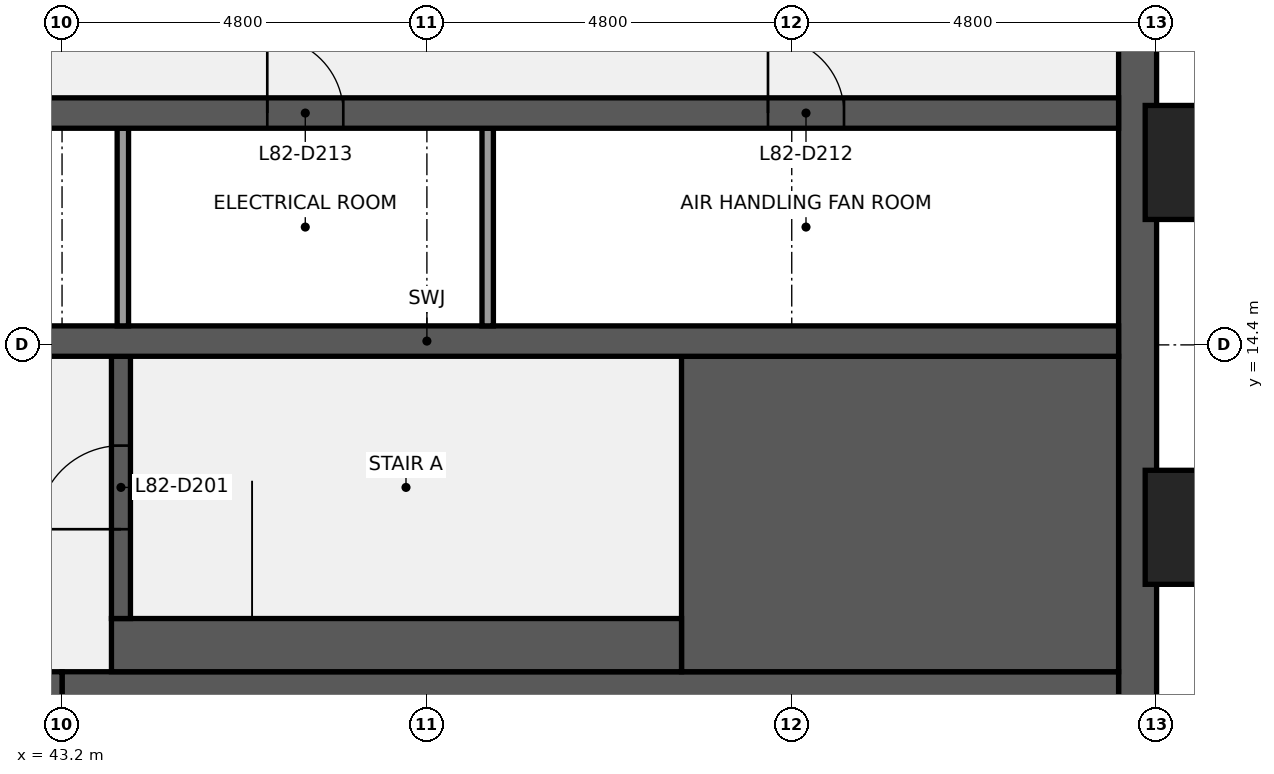
"""IFC4 building model, lengths in metres.
Left out: names, types, materials, properties, quantities, classifications, styles, units other than length and angle.
Written with IfcOpenShell. Run it as: python <this file> out.ifc"""

import sys

from ifc_helpers import new_model, si_unit, direction, frame, frame_2d, origin, origin_2d, place, context, subcontext, project, spatial, rectangle, extrude, element, fill, save


model = new_model("IFC4")
c1 = context("Model", 3, precision=1e-05, world=origin(), true_north=direction((0.0, 1.0)))
c2 = subcontext(c1, "Body", "Model", "MODEL_VIEW")
j1 = project(units=[si_unit("LENGTHUNIT", "METRE"), si_unit("PLANEANGLEUNIT", "RADIAN")], contexts=[c1])
p1 = place(None, origin())
s1 = spatial("IfcSite", under=j1, at=p1, CompositionType="ELEMENT")
p2 = place(p1, origin())
s2 = spatial("IfcBuilding", under=s1, at=p2, CompositionType="ELEMENT")
p3 = place(p2, frame((0.0, 0.0, 366.3)))
s3 = spatial("IfcBuildingStorey", under=s2, at=p3, CompositionType="ELEMENT", Elevation=366.3)
p4 = place(p3, frame((57.35, 38.4, 0.0), z_axis=(0.0, 0.0, 1.0), x_axis=(0.0, -1.0, 0.0)))
e1 = element("IfcWall", 1, at=p4, inside=s3, PredefinedType="SHEAR", context=c2, shape_type="SweptSolid", body=[
    extrude(rectangle(XDim=28.8, YDim=0.5, at=frame_2d((14.4, 0.0))), origin(), (0.0, 0.0, 1.0), 3.75),
])
p5 = place(p3, frame((57.1, 9.85, 0.0), z_axis=(0.0, 0.0, 1.0), x_axis=(-1.0, 0.0, 0.0)))
e2 = element("IfcWall", 2, at=p5, inside=s3, PredefinedType="SHEAR", context=c2, shape_type="SweptSolid", body=[
    extrude(rectangle(XDim=13.9, YDim=0.5, at=frame_2d((6.95, 0.0))), origin(), (0.0, 0.0, 1.0), 3.75),
])
p6 = place(p3, frame((43.2, 9.85, 0.0), z_axis=(0.0, 0.0, 1.0), x_axis=(-1.0, 0.0, 0.0)))
e3 = element("IfcWall", 3, at=p6, inside=s3, PredefinedType="SHEAR", context=c2, shape_type="SweptSolid", body=[
    extrude(rectangle(XDim=4.3, YDim=0.5, at=frame_2d((2.15, 0.0))), origin(), (0.0, 0.0, 1.0), 3.75),
])
p7 = place(p6, frame((1.85, 0.0, 0.0)))
e4 = element("IfcOpeningElement", 4, at=p7, cuts=e3, PredefinedType="OPENING", context=c2, shape_type="SweptSolid", body=[
    extrude(rectangle(XDim=1.1, YDim=2.1, at=frame_2d((0.55, 1.05))), frame((0.0, 0.26, 0.0), z_axis=(0.0, -1.0, 0.0), x_axis=(1.0, 0.0, 0.0)), (0.0, 0.0, 1.0), 0.52),
])
p8 = place(p3, frame((51.35, 12.175, 0.0), z_axis=(0.0, 0.0, 1.0), x_axis=(1.0, 0.0, 0.0)))
e5 = element("IfcWall", 5, at=p8, inside=s3, PredefinedType="SHEAR", context=c2, shape_type="SweptSolid", body=[
    extrude(rectangle(XDim=5.75, YDim=4.15, at=frame_2d((2.875, 0.0))), origin(), (0.0, 0.0, 1.0), 3.75),
])
p9 = place(p3, frame((43.85, 10.45, 0.0), z_axis=(0.0, 0.0, 1.0), x_axis=(1.0, 0.0, 0.0)))
e6 = element("IfcWall", 6, at=p9, inside=s3, PredefinedType="SHEAR", context=c2, shape_type="SweptSolid", body=[
    extrude(rectangle(XDim=7.5, YDim=0.7, at=frame_2d((3.75, 0.0))), origin(), (0.0, 0.0, 1.0), 3.75),
])
p10 = place(p3, frame((43.975, 10.8, 0.0), z_axis=(0.0, 0.0, 1.0), x_axis=(0.0, 1.0, 0.0)))
e7 = element("IfcWall", 7, at=p10, inside=s3, PredefinedType="SHEAR", context=c2, shape_type="SweptSolid", body=[
    extrude(rectangle(XDim=3.45, YDim=0.25, at=frame_2d((1.725, 0.0))), origin(), (0.0, 0.0, 1.0), 3.75),
])
p11 = place(p10, frame((1.175, 0.0, 0.0)))
e8 = element("IfcOpeningElement", 8, at=p11, cuts=e7, PredefinedType="OPENING", context=c2, shape_type="SweptSolid", body=[
    extrude(rectangle(XDim=1.1, YDim=2.1, at=frame_2d((0.55, 1.05))), frame((0.0, 0.135, 0.0), z_axis=(0.0, -1.0, 0.0), x_axis=(1.0, 0.0, 0.0)), (0.0, 0.0, 1.0), 0.27),
])
p12 = place(p3, frame((38.9, 14.45, 0.0), z_axis=(0.0, 0.0, 1.0), x_axis=(1.0, 0.0, 0.0)))
e9 = element("IfcWall", 9, at=p12, inside=s3, PredefinedType="SHEAR", context=c2, shape_type="SweptSolid", body=[
    extrude(rectangle(XDim=18.2, YDim=0.4, at=frame_2d((9.1, 0.0))), origin(), (0.0, 0.0, 1.0), 3.75),
])
for number, where, z_axis, x_axis in (
    (10, (48.8, 14.65, 0.0), (0.0, 0.0, 1.0), (0.0, 1.0, 0.0)),
    (11, (44.0, 14.65, 0.0), (0.0, 0.0, 1.0), (0.0, 1.0, 0.0)),
):
    element("IfcWall", number, at=place(p3, frame(where, z_axis=z_axis, x_axis=x_axis)), inside=s3, PredefinedType="PARTITIONING", context=c2, shape_type="SweptSolid", body=[
        extrude(rectangle(XDim=2.6, YDim=0.15, at=frame_2d((1.3, 0.0))), origin(), (0.0, 0.0, 1.0), 3.75),
    ])
p13 = place(p3, frame((38.9, 17.45, 0.0), z_axis=(0.0, 0.0, 1.0), x_axis=(1.0, 0.0, 0.0)))
e12 = element("IfcWall", 12, at=p13, inside=s3, PredefinedType="SHEAR", context=c2, shape_type="SweptSolid", body=[
    extrude(rectangle(XDim=18.2, YDim=0.4, at=frame_2d((9.1, 0.0))), origin(), (0.0, 0.0, 1.0), 3.75),
])
p14 = place(p13, frame((13.587, 0.0, 0.0)))
e13 = element("IfcOpeningElement", 13, at=p14, cuts=e12, PredefinedType="OPENING", context=c2, shape_type="SweptSolid", body=[
    extrude(rectangle(XDim=1.0, YDim=2.1, at=frame_2d((0.5, 1.05))), frame((0.0, 0.21, 0.0), z_axis=(0.0, -1.0, 0.0), x_axis=(1.0, 0.0, 0.0)), (0.0, 0.0, 1.0), 0.42),
])
p15 = place(p13, frame((7.0, 0.0, 0.0)))
e14 = element("IfcOpeningElement", 14, at=p15, cuts=e12, PredefinedType="OPENING", context=c2, shape_type="SweptSolid", body=[
    extrude(rectangle(XDim=1.0, YDim=2.1, at=frame_2d((0.5, 1.05))), frame((0.0, 0.21, 0.0), z_axis=(0.0, -1.0, 0.0), x_axis=(1.0, 0.0, 0.0)), (0.0, 0.0, 1.0), 0.42),
])
p16 = place(p13, frame((2.012, 0.0, 0.0)))
e15 = element("IfcOpeningElement", 15, at=p16, cuts=e12, PredefinedType="OPENING", context=c2, shape_type="SweptSolid", body=[
    extrude(rectangle(XDim=1.0, YDim=2.1, at=frame_2d((0.5, 1.05))), frame((0.0, 0.21, 0.0), z_axis=(0.0, -1.0, 0.0), x_axis=(1.0, 0.0, 0.0)), (0.0, 0.0, 1.0), 0.42),
])
for number, where, z_axis, x_axis in (
    (16, (58.35, 12.0, 0.0), (0.0, 0.0, 1.0), (0.0, 1.0, 0.0)),
    (17, (58.35, 16.8, 0.0), (0.0, 0.0, 1.0), (0.0, 1.0, 0.0)),
):
    element("IfcColumn", number, at=place(p3, frame(where, z_axis=z_axis, x_axis=x_axis)), inside=s3, PredefinedType="PILASTER", context=c2, shape_type="SweptSolid", body=[
        extrude(rectangle(XDim=1.8, YDim=1.5, at=origin_2d()), origin(), (0.0, 0.0, 1.0), 4.0),
    ])
p17 = place(p11, origin())
e18 = element("IfcDoor", 18, at=p17, inside=s3, OperationType="SINGLE_SWING_LEFT", PredefinedType="DOOR", context=c2, shape_type="SweptSolid", body=[
    extrude(rectangle(XDim=1.1, YDim=2.1, at=frame_2d((0.55, 1.05))), frame((0.0, 0.025, 0.0), z_axis=(0.0, -1.0, 0.0), x_axis=(1.0, 0.0, 0.0)), (0.0, 0.0, 1.0), 0.05),
])
fill(e8, e18)
p18 = place(p14, origin())
e19 = element("IfcDoor", 19, at=p18, inside=s3, OperationType="SINGLE_SWING_LEFT", PredefinedType="DOOR", context=c2, shape_type="SweptSolid", body=[
    extrude(rectangle(XDim=1.0, YDim=2.1, at=frame_2d((0.5, 1.05))), frame((0.0, 0.025, 0.0), z_axis=(0.0, -1.0, 0.0), x_axis=(1.0, 0.0, 0.0)), (0.0, 0.0, 1.0), 0.05),
])
fill(e13, e19)
p19 = place(p15, origin())
e20 = element("IfcDoor", 20, at=p19, inside=s3, OperationType="SINGLE_SWING_LEFT", PredefinedType="DOOR", context=c2, shape_type="SweptSolid", body=[
    extrude(rectangle(XDim=1.0, YDim=2.1, at=frame_2d((0.5, 1.05))), frame((0.0, 0.025, 0.0), z_axis=(0.0, -1.0, 0.0), x_axis=(1.0, 0.0, 0.0)), (0.0, 0.0, 1.0), 0.05),
])
fill(e14, e20)
save(model, sys.argv[1])
